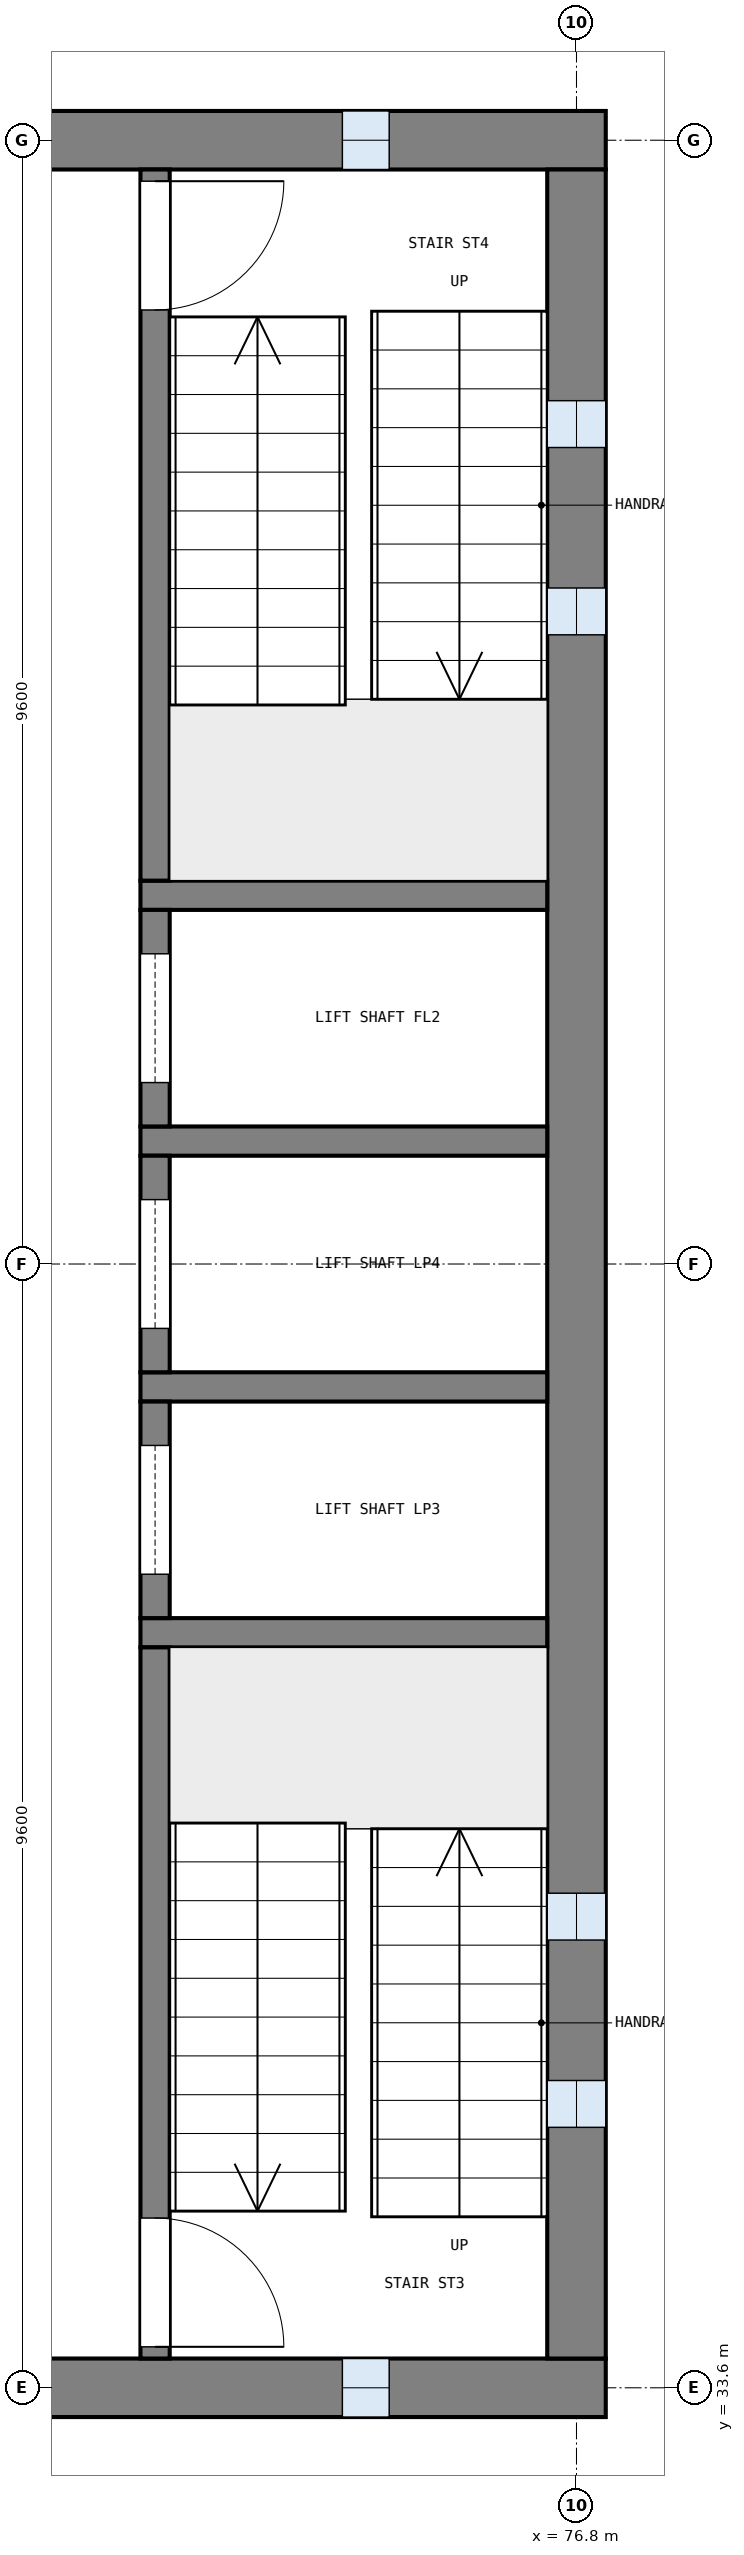
"""IFC4 building model, lengths in metres.
Left out: names, types, materials, properties, quantities, classifications, styles, units other than length and angle.
Written with IfcOpenShell. Run it as: python <this file> out.ifc"""

import sys

from ifc_helpers import new_model, si_unit, direction, frame, frame_2d, origin, place, context, subcontext, project, spatial, rectangle, extrude, element, fill, save


model = new_model("IFC4")
c1 = context("Model", 3, precision=1e-05, world=origin(), true_north=direction((0.0, 1.0)))
c2 = subcontext(c1, "Body", "Model", "MODEL_VIEW")
j1 = project(units=[si_unit("LENGTHUNIT", "METRE"), si_unit("PLANEANGLEUNIT", "RADIAN")], contexts=[c1])
p1 = place(None, origin())
s1 = spatial("IfcSite", under=j1, at=p1, CompositionType="ELEMENT")
p2 = place(p1, origin())
s2 = spatial("IfcBuilding", under=s1, at=p2, CompositionType="ELEMENT")
p3 = place(p2, frame((0.0, 0.0, 40.5)))
s3 = spatial("IfcBuildingStorey", under=s2, at=p3, CompositionType="ELEMENT", Elevation=40.5)
p4 = place(p3, frame((63.75, 52.8, 0.0), z_axis=(0.0, 0.0, 1.0), x_axis=(1.0, 0.0, 0.0)))
e1 = element("IfcWall", 1, at=p4, inside=s3, PredefinedType="SHEAR", context=c2, shape_type="SweptSolid", body=[
    extrude(rectangle(XDim=13.3, YDim=0.5, at=frame_2d((6.65, 0.0))), origin(), (0.0, 0.0, 1.0), 3.9),
])
p5 = place(p4, frame((11.05, 0.0, 1.0)))
e2 = element("IfcOpeningElement", 2, at=p5, cuts=e1, PredefinedType="OPENING", context=c2, shape_type="SweptSolid", body=[
    extrude(rectangle(XDim=0.4, YDim=2.0, at=frame_2d((0.2, 1.0))), frame((0.0, 0.26, 0.0), z_axis=(0.0, -1.0, 0.0), x_axis=(1.0, 0.0, 0.0)), (0.0, 0.0, 1.0), 0.52),
])
p6 = place(p3, frame((63.75, 33.6, 0.0), z_axis=(0.0, 0.0, 1.0), x_axis=(1.0, 0.0, 0.0)))
e3 = element("IfcWall", 3, at=p6, inside=s3, PredefinedType="SHEAR", context=c2, shape_type="SweptSolid", body=[
    extrude(rectangle(XDim=13.3, YDim=0.5, at=frame_2d((6.65, 0.0))), origin(), (0.0, 0.0, 1.0), 3.9),
])
p7 = place(p6, frame((11.05, 0.0, 1.0)))
e4 = element("IfcOpeningElement", 4, at=p7, cuts=e3, PredefinedType="OPENING", context=c2, shape_type="SweptSolid", body=[
    extrude(rectangle(XDim=0.4, YDim=2.0, at=frame_2d((0.2, 1.0))), frame((0.0, 0.26, 0.0), z_axis=(0.0, -1.0, 0.0), x_axis=(1.0, 0.0, 0.0)), (0.0, 0.0, 1.0), 0.52),
])
p8 = place(p3, frame((76.8, 33.85, 0.0), z_axis=(0.0, 0.0, 1.0), x_axis=(0.0, 1.0, 0.0)))
e5 = element("IfcWall", 5, at=p8, inside=s3, PredefinedType="SHEAR", context=c2, shape_type="SweptSolid", body=[
    extrude(rectangle(XDim=18.7, YDim=0.5, at=frame_2d((9.35, 0.0))), origin(), (0.0, 0.0, 1.0), 3.9),
])
p9 = place(p8, frame((1.975, 0.0, 1.0)))
e6 = element("IfcOpeningElement", 6, at=p9, cuts=e5, PredefinedType="OPENING", context=c2, shape_type="SweptSolid", body=[
    extrude(rectangle(XDim=0.4, YDim=2.0, at=frame_2d((0.2, 1.0))), frame((0.0, 0.26, 0.0), z_axis=(0.0, -1.0, 0.0), x_axis=(1.0, 0.0, 0.0)), (0.0, 0.0, 1.0), 0.52),
])
p10 = place(p8, frame((3.575, 0.0, 1.0)))
e7 = element("IfcOpeningElement", 7, at=p10, cuts=e5, PredefinedType="OPENING", context=c2, shape_type="SweptSolid", body=[
    extrude(rectangle(XDim=0.4, YDim=2.0, at=frame_2d((0.2, 1.0))), frame((0.0, 0.26, 0.0), z_axis=(0.0, -1.0, 0.0), x_axis=(1.0, 0.0, 0.0)), (0.0, 0.0, 1.0), 0.52),
])
p11 = place(p8, frame((14.725, 0.0, 1.0)))
e8 = element("IfcOpeningElement", 8, at=p11, cuts=e5, PredefinedType="OPENING", context=c2, shape_type="SweptSolid", body=[
    extrude(rectangle(XDim=0.4, YDim=2.0, at=frame_2d((0.2, 1.0))), frame((0.0, 0.26, 0.0), z_axis=(0.0, -1.0, 0.0), x_axis=(1.0, 0.0, 0.0)), (0.0, 0.0, 1.0), 0.52),
])
p12 = place(p8, frame((16.325, 0.0, 1.0)))
e9 = element("IfcOpeningElement", 9, at=p12, cuts=e5, PredefinedType="OPENING", context=c2, shape_type="SweptSolid", body=[
    extrude(rectangle(XDim=0.4, YDim=2.0, at=frame_2d((0.2, 1.0))), frame((0.0, 0.26, 0.0), z_axis=(0.0, -1.0, 0.0), x_axis=(1.0, 0.0, 0.0)), (0.0, 0.0, 1.0), 0.52),
])
for number, where, z_axis, x_axis in (
    (10, (76.55, 40.05, 0.0), (0.0, 0.0, 1.0), (-1.0, 0.0, 0.0)),
    (11, (76.55, 42.15, 0.0), (0.0, 0.0, 1.0), (-1.0, 0.0, 0.0)),
    (12, (76.55, 44.25, 0.0), (0.0, 0.0, 1.0), (-1.0, 0.0, 0.0)),
    (13, (76.55, 46.35, 0.0), (0.0, 0.0, 1.0), (-1.0, 0.0, 0.0)),
):
    element("IfcWall", number, at=place(p3, frame(where, z_axis=z_axis, x_axis=x_axis)), inside=s3, PredefinedType="SOLIDWALL", context=c2, shape_type="SweptSolid", body=[
        extrude(rectangle(XDim=3.475, YDim=0.25, at=frame_2d((1.738, 0.0))), origin(), (0.0, 0.0, 1.0), 3.6),
    ])
p13 = place(p3, frame((73.2, 33.85, 0.0), z_axis=(0.0, 0.0, 1.0), x_axis=(0.0, 1.0, 0.0)))
e14 = element("IfcWall", 14, at=p13, inside=s3, PredefinedType="SOLIDWALL", context=c2, shape_type="SweptSolid", body=[
    extrude(rectangle(XDim=6.075, YDim=0.25, at=frame_2d((3.038, 0.0))), origin(), (0.0, 0.0, 1.0), 3.6),
])
p14 = place(p13, frame((0.1, 0.0, 0.0)))
e15 = element("IfcOpeningElement", 15, at=p14, cuts=e14, PredefinedType="OPENING", context=c2, shape_type="SweptSolid", body=[
    extrude(rectangle(XDim=1.1, YDim=2.1, at=frame_2d((0.55, 1.05))), frame((0.0, 0.135, 0.0), z_axis=(0.0, -1.0, 0.0), x_axis=(1.0, 0.0, 0.0)), (0.0, 0.0, 1.0), 0.27),
])
p15 = place(p3, frame((73.2, 40.175, 0.0), z_axis=(0.0, 0.0, 1.0), x_axis=(0.0, 1.0, 0.0)))
e16 = element("IfcWall", 16, at=p15, inside=s3, PredefinedType="SOLIDWALL", context=c2, shape_type="SweptSolid", body=[
    extrude(rectangle(XDim=1.85, YDim=0.25, at=frame_2d((0.925, 0.0))), origin(), (0.0, 0.0, 1.0), 3.6),
])
p16 = place(p15, frame((0.375, 0.0, 0.0)))
e17 = element("IfcOpeningElement", 17, at=p16, cuts=e16, PredefinedType="OPENING", context=c2, shape_type="SweptSolid", body=[
    extrude(rectangle(XDim=1.1, YDim=2.1, at=frame_2d((0.55, 1.05))), frame((0.0, 0.135, 0.0), z_axis=(0.0, -1.0, 0.0), x_axis=(1.0, 0.0, 0.0)), (0.0, 0.0, 1.0), 0.27),
])
p17 = place(p3, frame((73.2, 42.275, 0.0), z_axis=(0.0, 0.0, 1.0), x_axis=(0.0, 1.0, 0.0)))
e18 = element("IfcWall", 18, at=p17, inside=s3, PredefinedType="SOLIDWALL", context=c2, shape_type="SweptSolid", body=[
    extrude(rectangle(XDim=1.85, YDim=0.25, at=frame_2d((0.925, 0.0))), origin(), (0.0, 0.0, 1.0), 3.6),
])
p18 = place(p17, frame((0.375, 0.0, 0.0)))
e19 = element("IfcOpeningElement", 19, at=p18, cuts=e18, PredefinedType="OPENING", context=c2, shape_type="SweptSolid", body=[
    extrude(rectangle(XDim=1.1, YDim=2.1, at=frame_2d((0.55, 1.05))), frame((0.0, 0.135, 0.0), z_axis=(0.0, -1.0, 0.0), x_axis=(1.0, 0.0, 0.0)), (0.0, 0.0, 1.0), 0.27),
])
p19 = place(p3, frame((73.2, 44.375, 0.0), z_axis=(0.0, 0.0, 1.0), x_axis=(0.0, 1.0, 0.0)))
e20 = element("IfcWall", 20, at=p19, inside=s3, PredefinedType="SOLIDWALL", context=c2, shape_type="SweptSolid", body=[
    extrude(rectangle(XDim=1.85, YDim=0.25, at=frame_2d((0.925, 0.0))), origin(), (0.0, 0.0, 1.0), 3.6),
])
p20 = place(p19, frame((0.375, 0.0, 0.0)))
e21 = element("IfcOpeningElement", 21, at=p20, cuts=e20, PredefinedType="OPENING", context=c2, shape_type="SweptSolid", body=[
    extrude(rectangle(XDim=1.1, YDim=2.1, at=frame_2d((0.55, 1.05))), frame((0.0, 0.135, 0.0), z_axis=(0.0, -1.0, 0.0), x_axis=(1.0, 0.0, 0.0)), (0.0, 0.0, 1.0), 0.27),
])
p21 = place(p3, frame((73.2, 46.475, 0.0), z_axis=(0.0, 0.0, 1.0), x_axis=(0.0, 1.0, 0.0)))
e22 = element("IfcWall", 22, at=p21, inside=s3, PredefinedType="SOLIDWALL", context=c2, shape_type="SweptSolid", body=[
    extrude(rectangle(XDim=6.075, YDim=0.25, at=frame_2d((3.038, 0.0))), origin(), (0.0, 0.0, 1.0), 3.6),
])
p22 = place(p21, frame((4.875, 0.0, 0.0)))
e23 = element("IfcOpeningElement", 23, at=p22, cuts=e22, PredefinedType="OPENING", context=c2, shape_type="SweptSolid", body=[
    extrude(rectangle(XDim=1.1, YDim=2.1, at=frame_2d((0.55, 1.05))), frame((0.0, 0.135, 0.0), z_axis=(0.0, -1.0, 0.0), x_axis=(1.0, 0.0, 0.0)), (0.0, 0.0, 1.0), 0.27),
])
p23 = place(p9, origin())
e24 = element("IfcWindow", 24, at=p23, inside=s3, PartitioningType="SINGLE_PANEL", PredefinedType="WINDOW", context=c2, shape_type="SweptSolid", body=[
    extrude(rectangle(XDim=0.4, YDim=2.0, at=frame_2d((0.2, 1.0))), frame((0.0, 0.03, 0.0), z_axis=(0.0, -1.0, 0.0), x_axis=(1.0, 0.0, 0.0)), (0.0, 0.0, 1.0), 0.06),
])
fill(e6, e24)
p24 = place(p10, origin())
e25 = element("IfcWindow", 25, at=p24, inside=s3, PartitioningType="SINGLE_PANEL", PredefinedType="WINDOW", context=c2, shape_type="SweptSolid", body=[
    extrude(rectangle(XDim=0.4, YDim=2.0, at=frame_2d((0.2, 1.0))), frame((0.0, 0.03, 0.0), z_axis=(0.0, -1.0, 0.0), x_axis=(1.0, 0.0, 0.0)), (0.0, 0.0, 1.0), 0.06),
])
fill(e7, e25)
p25 = place(p11, origin())
e26 = element("IfcWindow", 26, at=p25, inside=s3, PartitioningType="SINGLE_PANEL", PredefinedType="WINDOW", context=c2, shape_type="SweptSolid", body=[
    extrude(rectangle(XDim=0.4, YDim=2.0, at=frame_2d((0.2, 1.0))), frame((0.0, 0.03, 0.0), z_axis=(0.0, -1.0, 0.0), x_axis=(1.0, 0.0, 0.0)), (0.0, 0.0, 1.0), 0.06),
])
fill(e8, e26)
p26 = place(p12, origin())
e27 = element("IfcWindow", 27, at=p26, inside=s3, PartitioningType="SINGLE_PANEL", PredefinedType="WINDOW", context=c2, shape_type="SweptSolid", body=[
    extrude(rectangle(XDim=0.4, YDim=2.0, at=frame_2d((0.2, 1.0))), frame((0.0, 0.03, 0.0), z_axis=(0.0, -1.0, 0.0), x_axis=(1.0, 0.0, 0.0)), (0.0, 0.0, 1.0), 0.06),
])
fill(e9, e27)
p27 = place(p7, origin())
e28 = element("IfcWindow", 28, at=p27, inside=s3, PartitioningType="SINGLE_PANEL", PredefinedType="WINDOW", context=c2, shape_type="SweptSolid", body=[
    extrude(rectangle(XDim=0.4, YDim=2.0, at=frame_2d((0.2, 1.0))), frame((0.0, 0.03, 0.0), z_axis=(0.0, -1.0, 0.0), x_axis=(1.0, 0.0, 0.0)), (0.0, 0.0, 1.0), 0.06),
])
fill(e4, e28)
p28 = place(p5, origin())
e29 = element("IfcWindow", 29, at=p28, inside=s3, PartitioningType="SINGLE_PANEL", PredefinedType="WINDOW", context=c2, shape_type="SweptSolid", body=[
    extrude(rectangle(XDim=0.4, YDim=2.0, at=frame_2d((0.2, 1.0))), frame((0.0, 0.03, 0.0), z_axis=(0.0, -1.0, 0.0), x_axis=(1.0, 0.0, 0.0)), (0.0, 0.0, 1.0), 0.06),
])
fill(e2, e29)
p29 = place(p14, frame((1.1, 0.0, 0.0), z_axis=(0.0, 0.0, 1.0), x_axis=(-1.0, 0.0, 0.0)))
e30 = element("IfcDoor", 30, at=p29, inside=s3, OperationType="SINGLE_SWING_RIGHT", PredefinedType="DOOR", context=c2, shape_type="SweptSolid", body=[
    extrude(rectangle(XDim=1.1, YDim=2.1, at=frame_2d((0.55, 1.05))), frame((0.0, 0.025, 0.0), z_axis=(0.0, -1.0, 0.0), x_axis=(1.0, 0.0, 0.0)), (0.0, 0.0, 1.0), 0.05),
])
fill(e15, e30)
p30 = place(p22, frame((1.1, 0.0, 0.0), z_axis=(0.0, 0.0, 1.0), x_axis=(-1.0, 0.0, 0.0)))
e31 = element("IfcDoor", 31, at=p30, inside=s3, OperationType="SINGLE_SWING_LEFT", PredefinedType="DOOR", context=c2, shape_type="SweptSolid", body=[
    extrude(rectangle(XDim=1.1, YDim=2.1, at=frame_2d((0.55, 1.05))), frame((0.0, 0.025, 0.0), z_axis=(0.0, -1.0, 0.0), x_axis=(1.0, 0.0, 0.0)), (0.0, 0.0, 1.0), 0.05),
])
fill(e23, e31)
p31 = place(p16, origin())
e32 = element("IfcDoor", 32, at=p31, inside=s3, OperationType="SLIDING_TO_LEFT", PredefinedType="DOOR", context=c2, shape_type="SweptSolid", body=[
    extrude(rectangle(XDim=1.1, YDim=2.1, at=frame_2d((0.55, 1.05))), frame((0.0, 0.025, 0.0), z_axis=(0.0, -1.0, 0.0), x_axis=(1.0, 0.0, 0.0)), (0.0, 0.0, 1.0), 0.05),
])
fill(e17, e32)
p32 = place(p18, origin())
e33 = element("IfcDoor", 33, at=p32, inside=s3, OperationType="SLIDING_TO_LEFT", PredefinedType="DOOR", context=c2, shape_type="SweptSolid", body=[
    extrude(rectangle(XDim=1.1, YDim=2.1, at=frame_2d((0.55, 1.05))), frame((0.0, 0.025, 0.0), z_axis=(0.0, -1.0, 0.0), x_axis=(1.0, 0.0, 0.0)), (0.0, 0.0, 1.0), 0.05),
])
fill(e19, e33)
p33 = place(p20, origin())
e34 = element("IfcDoor", 34, at=p33, inside=s3, OperationType="SLIDING_TO_LEFT", PredefinedType="DOOR", context=c2, shape_type="SweptSolid", body=[
    extrude(rectangle(XDim=1.1, YDim=2.1, at=frame_2d((0.55, 1.05))), frame((0.0, 0.025, 0.0), z_axis=(0.0, -1.0, 0.0), x_axis=(1.0, 0.0, 0.0)), (0.0, 0.0, 1.0), 0.05),
])
fill(e21, e34)
save(model, sys.argv[1])
